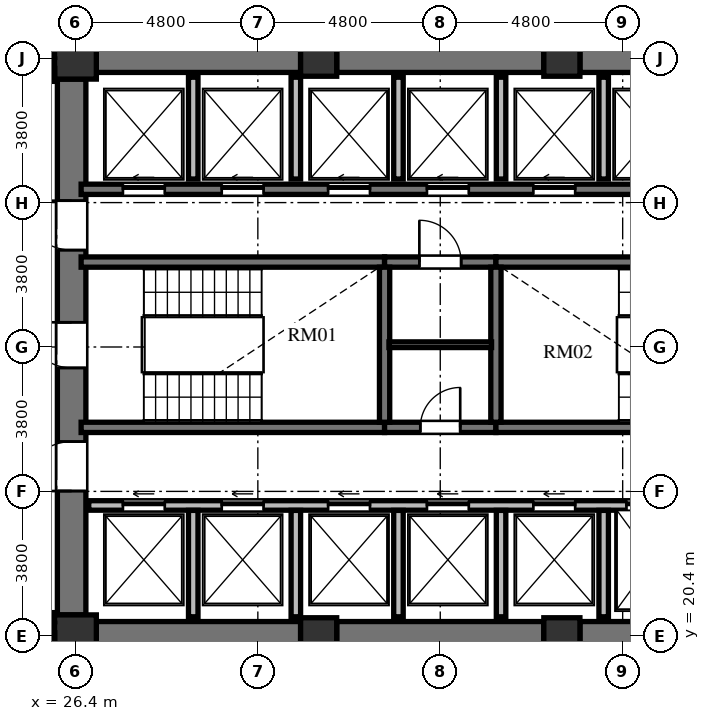
"""IFC4 building model, lengths in metres.
Left out: names, types, materials, properties, quantities, classifications, styles, units other than length and angle.
Written with IfcOpenShell. Run it as: python <this file> out.ifc"""

import sys

from ifc_helpers import new_model, si_unit, direction, frame, frame_2d, origin, origin_2d, place, context, subcontext, project, spatial, rectangle, extrude, element, fill, save


model = new_model("IFC4")
c1 = context("Model", 3, precision=1e-05, world=origin(), true_north=direction((0.0, 1.0)))
c2 = subcontext(c1, "Body", "Model", "MODEL_VIEW")
j1 = project(units=[si_unit("LENGTHUNIT", "METRE"), si_unit("PLANEANGLEUNIT", "RADIAN")], contexts=[c1])
p1 = place(None, origin())
s1 = spatial("IfcSite", under=j1, at=p1, CompositionType="ELEMENT")
p2 = place(p1, origin())
s2 = spatial("IfcBuilding", under=s1, at=p2, CompositionType="ELEMENT")
p3 = place(p2, frame((0.0, 0.0, 103.632)))
s3 = spatial("IfcBuildingStorey", under=s2, at=p3, CompositionType="ELEMENT", Elevation=103.632)
p4 = place(p3, frame((26.4, 20.4, 0.0), z_axis=(0.0, 0.0, 1.0), x_axis=(1.0, 0.0, 0.0)))
e1 = element("IfcColumn", 1, at=p4, inside=s3, PredefinedType="COLUMN", context=c2, shape_type="SweptSolid", body=[
    extrude(rectangle(XDim=1.1, YDim=1.1, at=origin_2d()), origin(), (0.0, 0.0, 1.0), 3.648),
])
for number, where, z_axis, x_axis in (
    (2, (32.8, 20.4, 0.0), (0.0, 0.0, 1.0), (1.0, 0.0, 0.0)),
    (3, (39.2, 20.4, 0.0), (0.0, 0.0, 1.0), (1.0, 0.0, 0.0)),
    (4, (39.2, 35.6, 0.0), (0.0, 0.0, 1.0), (1.0, 0.0, 0.0)),
    (5, (32.8, 35.6, 0.0), (0.0, 0.0, 1.0), (1.0, 0.0, 0.0)),
):
    element("IfcColumn", number, at=place(p3, frame(where, z_axis=z_axis, x_axis=x_axis)), inside=s3, PredefinedType="COLUMN", context=c2, shape_type="SweptSolid", body=[
        extrude(rectangle(XDim=0.95, YDim=0.95, at=origin_2d()), origin(), (0.0, 0.0, 1.0), 3.648),
    ])
p5 = place(p3, frame((26.4, 35.6, 0.0), z_axis=(0.0, 0.0, 1.0), x_axis=(1.0, 0.0, 0.0)))
e6 = element("IfcColumn", 6, at=p5, inside=s3, PredefinedType="COLUMN", context=c2, shape_type="SweptSolid", body=[
    extrude(rectangle(XDim=1.1, YDim=1.1, at=origin_2d()), origin(), (0.0, 0.0, 1.0), 3.648),
])
p6 = place(p3, frame((26.3, 20.95, 0.0), z_axis=(0.0, 0.0, 1.0), x_axis=(0.0, 1.0, 0.0)))
e7 = element("IfcWall", 7, at=p6, inside=s3, PredefinedType="SHEAR", context=c2, shape_type="SweptSolid", body=[
    extrude(rectangle(XDim=14.1, YDim=0.75, at=frame_2d((7.05, 0.0))), origin(), (0.0, 0.0, 1.0), 3.648),
])
p7 = place(p6, frame((6.5, 0.0, 0.0)))
e8 = element("IfcOpeningElement", 8, at=p7, cuts=e7, PredefinedType="OPENING", context=c2, shape_type="SweptSolid", body=[
    extrude(rectangle(XDim=1.2, YDim=2.15, at=frame_2d((0.6, 1.075))), frame((0.0, 0.385, 0.0), z_axis=(0.0, -1.0, 0.0), x_axis=(1.0, 0.0, 0.0)), (0.0, 0.0, 1.0), 0.77),
])
p8 = place(p6, frame((9.6, 0.0, 0.0)))
e9 = element("IfcOpeningElement", 9, at=p8, cuts=e7, PredefinedType="OPENING", context=c2, shape_type="SweptSolid", body=[
    extrude(rectangle(XDim=1.3, YDim=2.2, at=frame_2d((0.65, 1.1))), frame((0.0, 0.385, 0.0), z_axis=(0.0, -1.0, 0.0), x_axis=(1.0, 0.0, 0.0)), (0.0, 0.0, 1.0), 0.77),
])
p9 = place(p6, frame((3.26, 0.0, 0.0)))
e10 = element("IfcOpeningElement", 10, at=p9, cuts=e7, PredefinedType="OPENING", context=c2, shape_type="SweptSolid", body=[
    extrude(rectangle(XDim=1.3, YDim=2.2, at=frame_2d((0.65, 1.1))), frame((0.0, 0.385, 0.0), z_axis=(0.0, -1.0, 0.0), x_axis=(1.0, 0.0, 0.0)), (0.0, 0.0, 1.0), 0.77),
])
for number, where, z_axis, x_axis in (
    (11, (26.95, 20.4, 0.0), (0.0, 0.0, 1.0), (1.0, 0.0, 0.0)),
    (12, (26.95, 35.6, 0.0), (0.0, 0.0, 1.0), (1.0, 0.0, 0.0)),
):
    element("IfcWall", number, at=place(p3, frame(where, z_axis=z_axis, x_axis=x_axis)), inside=s3, PredefinedType="SHEAR", context=c2, shape_type="SweptSolid", body=[
        extrude(rectangle(XDim=5.375, YDim=0.75, at=frame_2d((2.688, 0.0))), origin(), (0.0, 0.0, 1.0), 3.648),
    ])
for number, where, z_axis, x_axis in (
    (13, (33.275, 20.4, 0.0), (0.0, 0.0, 1.0), (1.0, 0.0, 0.0)),
    (14, (33.275, 35.6, 0.0), (0.0, 0.0, 1.0), (1.0, 0.0, 0.0)),
):
    element("IfcWall", number, at=place(p3, frame(where, z_axis=z_axis, x_axis=x_axis)), inside=s3, PredefinedType="SHEAR", context=c2, shape_type="SweptSolid", body=[
        extrude(rectangle(XDim=5.45, YDim=0.75, at=frame_2d((2.725, 0.0))), origin(), (0.0, 0.0, 1.0), 3.648),
    ])
for number, where, z_axis, x_axis in (
    (15, (39.675, 20.4, 0.0), (0.0, 0.0, 1.0), (1.0, 0.0, 0.0)),
    (16, (39.675, 35.6, 0.0), (0.0, 0.0, 1.0), (1.0, 0.0, 0.0)),
):
    element("IfcWall", number, at=place(p3, frame(where, z_axis=z_axis, x_axis=x_axis)), inside=s3, PredefinedType="SHEAR", context=c2, shape_type="SweptSolid", body=[
        extrude(rectangle(XDim=5.375, YDim=0.75, at=frame_2d((2.688, 0.0))), origin(), (0.0, 0.0, 1.0), 3.648),
    ])
p10 = place(p3, frame((26.55, 30.235, 0.0), z_axis=(0.0, 0.0, 1.0), x_axis=(1.0, 0.0, 0.0)))
e17 = element("IfcWall", 17, at=p10, inside=s3, PredefinedType="SHEAR", context=c2, shape_type="SweptSolid", body=[
    extrude(rectangle(XDim=7.985, YDim=0.27, at=frame_2d((3.992, 0.0))), origin(), (0.0, 0.0, 1.0), 3.648),
])
p11 = place(p3, frame((34.535, 30.235, 0.0), z_axis=(0.0, 0.0, 1.0), x_axis=(1.0, 0.0, 0.0)))
e18 = element("IfcWall", 18, at=p11, inside=s3, PredefinedType="SHEAR", context=c2, shape_type="SweptSolid", body=[
    extrude(rectangle(XDim=2.93, YDim=0.27, at=frame_2d((1.465, 0.0))), origin(), (0.0, 0.0, 1.0), 3.648),
])
p12 = place(p11, frame((0.915, 0.0, 0.0)))
e19 = element("IfcOpeningElement", 19, at=p12, cuts=e18, PredefinedType="OPENING", context=c2, shape_type="SweptSolid", body=[
    extrude(rectangle(XDim=1.1, YDim=2.15, at=frame_2d((0.55, 1.075))), frame((0.0, 0.145, 0.0), z_axis=(0.0, -1.0, 0.0), x_axis=(1.0, 0.0, 0.0)), (0.0, 0.0, 1.0), 0.29),
])
p13 = place(p3, frame((37.465, 30.235, 0.0), z_axis=(0.0, 0.0, 1.0), x_axis=(1.0, 0.0, 0.0)))
e20 = element("IfcWall", 20, at=p13, inside=s3, PredefinedType="SHEAR", context=c2, shape_type="SweptSolid", body=[
    extrude(rectangle(XDim=7.985, YDim=0.27, at=frame_2d((3.992, 0.0))), origin(), (0.0, 0.0, 1.0), 3.648),
])
p14 = place(p13, frame((6.455, 0.0, 0.0)))
e21 = element("IfcOpeningElement", 21, at=p14, cuts=e20, PredefinedType="OPENING", context=c2, shape_type="SweptSolid", body=[
    extrude(rectangle(XDim=1.2, YDim=2.15, at=frame_2d((0.6, 1.075))), frame((0.0, 0.145, 0.0), z_axis=(0.0, -1.0, 0.0), x_axis=(1.0, 0.0, 0.0)), (0.0, 0.0, 1.0), 0.29),
])
p15 = place(p3, frame((26.55, 25.885, 0.0), z_axis=(0.0, 0.0, 1.0), x_axis=(1.0, 0.0, 0.0)))
e22 = element("IfcWall", 22, at=p15, inside=s3, PredefinedType="SHEAR", context=c2, shape_type="SweptSolid", body=[
    extrude(rectangle(XDim=7.985, YDim=0.27, at=frame_2d((3.992, 0.0))), origin(), (0.0, 0.0, 1.0), 3.648),
])
p16 = place(p3, frame((34.535, 25.885, 0.0), z_axis=(0.0, 0.0, 1.0), x_axis=(1.0, 0.0, 0.0)))
e23 = element("IfcWall", 23, at=p16, inside=s3, PredefinedType="SHEAR", context=c2, shape_type="SweptSolid", body=[
    extrude(rectangle(XDim=2.93, YDim=0.27, at=frame_2d((1.465, 0.0))), origin(), (0.0, 0.0, 1.0), 3.648),
])
p17 = place(p16, frame((0.94, 0.0, 0.0)))
e24 = element("IfcOpeningElement", 24, at=p17, cuts=e23, PredefinedType="OPENING", context=c2, shape_type="SweptSolid", body=[
    extrude(rectangle(XDim=1.05, YDim=2.15, at=frame_2d((0.525, 1.075))), frame((0.0, 0.145, 0.0), z_axis=(0.0, -1.0, 0.0), x_axis=(1.0, 0.0, 0.0)), (0.0, 0.0, 1.0), 0.29),
])
p18 = place(p3, frame((37.465, 25.885, 0.0), z_axis=(0.0, 0.0, 1.0), x_axis=(1.0, 0.0, 0.0)))
e25 = element("IfcWall", 25, at=p18, inside=s3, PredefinedType="SHEAR", context=c2, shape_type="SweptSolid", body=[
    extrude(rectangle(XDim=7.985, YDim=0.27, at=frame_2d((3.992, 0.0))), origin(), (0.0, 0.0, 1.0), 3.648),
])
for number, where, z_axis, x_axis in (
    (26, (34.535, 26.02, 0.0), (0.0, 0.0, 1.0), (0.0, 1.0, 0.0)),
    (27, (37.465, 26.02, 0.0), (0.0, 0.0, 1.0), (0.0, 1.0, 0.0)),
):
    element("IfcWall", number, at=place(p3, frame(where, z_axis=z_axis, x_axis=x_axis)), inside=s3, PredefinedType="SHEAR", context=c2, shape_type="SweptSolid", body=[
        extrude(rectangle(XDim=4.08, YDim=0.27, at=frame_2d((2.04, 0.0))), origin(), (0.0, 0.0, 1.0), 3.648),
    ])
p19 = place(p3, frame((34.65, 28.06, 0.0), z_axis=(0.0, 0.0, 1.0), x_axis=(1.0, 0.0, 0.0)))
e28 = element("IfcWall", 28, at=p19, inside=s3, PredefinedType="PARTITIONING", context=c2, shape_type="SweptSolid", body=[
    extrude(rectangle(XDim=2.7, YDim=0.15, at=frame_2d((1.35, 0.0))), origin(), (0.0, 0.0, 1.0), 3.428),
])
p20 = place(p3, frame((26.55, 32.15, 0.0), z_axis=(0.0, 0.0, 1.0), x_axis=(1.0, 0.0, 0.0)))
e29 = element("IfcWall", 29, at=p20, inside=s3, PredefinedType="SHEAR", context=c2, shape_type="SweptSolid", body=[
    extrude(rectangle(XDim=16.4, YDim=0.27, at=frame_2d((8.2, 0.0))), origin(), (0.0, 0.0, 1.0), 3.648),
])
p21 = place(p20, frame((1.1, 0.0, 0.0)))
e30 = element("IfcOpeningElement", 30, at=p21, cuts=e29, PredefinedType="OPENING", context=c2, shape_type="SweptSolid", body=[
    extrude(rectangle(XDim=1.1, YDim=2.2, at=frame_2d((0.55, 1.1))), frame((0.0, 0.145, 0.0), z_axis=(0.0, -1.0, 0.0), x_axis=(1.0, 0.0, 0.0)), (0.0, 0.0, 1.0), 0.29),
])
p22 = place(p20, frame((3.7, 0.0, 0.0)))
e31 = element("IfcOpeningElement", 31, at=p22, cuts=e29, PredefinedType="OPENING", context=c2, shape_type="SweptSolid", body=[
    extrude(rectangle(XDim=1.1, YDim=2.2, at=frame_2d((0.55, 1.1))), frame((0.0, 0.145, 0.0), z_axis=(0.0, -1.0, 0.0), x_axis=(1.0, 0.0, 0.0)), (0.0, 0.0, 1.0), 0.29),
])
p23 = place(p20, frame((6.5, 0.0, 0.0)))
e32 = element("IfcOpeningElement", 32, at=p23, cuts=e29, PredefinedType="OPENING", context=c2, shape_type="SweptSolid", body=[
    extrude(rectangle(XDim=1.1, YDim=2.2, at=frame_2d((0.55, 1.1))), frame((0.0, 0.145, 0.0), z_axis=(0.0, -1.0, 0.0), x_axis=(1.0, 0.0, 0.0)), (0.0, 0.0, 1.0), 0.29),
])
p24 = place(p20, frame((9.1, 0.0, 0.0)))
e33 = element("IfcOpeningElement", 33, at=p24, cuts=e29, PredefinedType="OPENING", context=c2, shape_type="SweptSolid", body=[
    extrude(rectangle(XDim=1.1, YDim=2.2, at=frame_2d((0.55, 1.1))), frame((0.0, 0.145, 0.0), z_axis=(0.0, -1.0, 0.0), x_axis=(1.0, 0.0, 0.0)), (0.0, 0.0, 1.0), 0.29),
])
p25 = place(p20, frame((11.9, 0.0, 0.0)))
e34 = element("IfcOpeningElement", 34, at=p25, cuts=e29, PredefinedType="OPENING", context=c2, shape_type="SweptSolid", body=[
    extrude(rectangle(XDim=1.1, YDim=2.2, at=frame_2d((0.55, 1.1))), frame((0.0, 0.145, 0.0), z_axis=(0.0, -1.0, 0.0), x_axis=(1.0, 0.0, 0.0)), (0.0, 0.0, 1.0), 0.29),
])
p26 = place(p20, frame((14.5, 0.0, 0.0)))
e35 = element("IfcOpeningElement", 35, at=p26, cuts=e29, PredefinedType="OPENING", context=c2, shape_type="SweptSolid", body=[
    extrude(rectangle(XDim=1.1, YDim=2.2, at=frame_2d((0.55, 1.1))), frame((0.0, 0.145, 0.0), z_axis=(0.0, -1.0, 0.0), x_axis=(1.0, 0.0, 0.0)), (0.0, 0.0, 1.0), 0.29),
])
p27 = place(p3, frame((26.75, 23.83, 0.0), z_axis=(0.0, 0.0, 1.0), x_axis=(1.0, 0.0, 0.0)))
e36 = element("IfcWall", 36, at=p27, inside=s3, PredefinedType="SOLIDWALL", context=c2, shape_type="SweptSolid", body=[
    extrude(rectangle(XDim=16.2, YDim=0.25, at=frame_2d((8.1, 0.0))), origin(), (0.0, 0.0, 1.0), 3.428),
])
p28 = place(p27, frame((0.9, 0.0, 0.0)))
e37 = element("IfcOpeningElement", 37, at=p28, cuts=e36, PredefinedType="OPENING", context=c2, shape_type="SweptSolid", body=[
    extrude(rectangle(XDim=1.1, YDim=2.2, at=frame_2d((0.55, 1.1))), frame((0.0, 0.135, 0.0), z_axis=(0.0, -1.0, 0.0), x_axis=(1.0, 0.0, 0.0)), (0.0, 0.0, 1.0), 0.27),
])
p29 = place(p27, frame((3.5, 0.0, 0.0)))
e38 = element("IfcOpeningElement", 38, at=p29, cuts=e36, PredefinedType="OPENING", context=c2, shape_type="SweptSolid", body=[
    extrude(rectangle(XDim=1.1, YDim=2.2, at=frame_2d((0.55, 1.1))), frame((0.0, 0.135, 0.0), z_axis=(0.0, -1.0, 0.0), x_axis=(1.0, 0.0, 0.0)), (0.0, 0.0, 1.0), 0.27),
])
p30 = place(p27, frame((6.3, 0.0, 0.0)))
e39 = element("IfcOpeningElement", 39, at=p30, cuts=e36, PredefinedType="OPENING", context=c2, shape_type="SweptSolid", body=[
    extrude(rectangle(XDim=1.1, YDim=2.2, at=frame_2d((0.55, 1.1))), frame((0.0, 0.135, 0.0), z_axis=(0.0, -1.0, 0.0), x_axis=(1.0, 0.0, 0.0)), (0.0, 0.0, 1.0), 0.27),
])
p31 = place(p27, frame((8.9, 0.0, 0.0)))
e40 = element("IfcOpeningElement", 40, at=p31, cuts=e36, PredefinedType="OPENING", context=c2, shape_type="SweptSolid", body=[
    extrude(rectangle(XDim=1.1, YDim=2.2, at=frame_2d((0.55, 1.1))), frame((0.0, 0.135, 0.0), z_axis=(0.0, -1.0, 0.0), x_axis=(1.0, 0.0, 0.0)), (0.0, 0.0, 1.0), 0.27),
])
p32 = place(p27, frame((11.7, 0.0, 0.0)))
e41 = element("IfcOpeningElement", 41, at=p32, cuts=e36, PredefinedType="OPENING", context=c2, shape_type="SweptSolid", body=[
    extrude(rectangle(XDim=1.1, YDim=2.2, at=frame_2d((0.55, 1.1))), frame((0.0, 0.135, 0.0), z_axis=(0.0, -1.0, 0.0), x_axis=(1.0, 0.0, 0.0)), (0.0, 0.0, 1.0), 0.27),
])
p33 = place(p27, frame((14.15, 0.0, 0.0)))
e42 = element("IfcOpeningElement", 42, at=p33, cuts=e36, PredefinedType="OPENING", context=c2, shape_type="SweptSolid", body=[
    extrude(rectangle(XDim=1.4, YDim=2.3, at=frame_2d((0.7, 1.15))), frame((0.0, 0.135, 0.0), z_axis=(0.0, -1.0, 0.0), x_axis=(1.0, 0.0, 0.0)), (0.0, 0.0, 1.0), 0.27),
])
p34 = place(p3, frame((29.5, 32.42, 0.0), z_axis=(0.0, 0.0, 1.0), x_axis=(0.0, 1.0, 0.0)))
e43 = element("IfcWall", 43, at=p34, inside=s3, PredefinedType="SOLIDWALL", context=c2, shape_type="SweptSolid", body=[
    extrude(rectangle(XDim=2.68, YDim=0.25, at=frame_2d((1.34, 0.0))), origin(), (0.0, 0.0, 1.0), 3.428),
])
p35 = place(p3, frame((29.5, 20.9, 0.0), z_axis=(0.0, 0.0, 1.0), x_axis=(0.0, 1.0, 0.0)))
e44 = element("IfcWall", 44, at=p35, inside=s3, PredefinedType="SOLIDWALL", context=c2, shape_type="SweptSolid", body=[
    extrude(rectangle(XDim=2.8, YDim=0.25, at=frame_2d((1.4, 0.0))), origin(), (0.0, 0.0, 1.0), 3.428),
])
p36 = place(p3, frame((32.2, 32.42, 0.0), z_axis=(0.0, 0.0, 1.0), x_axis=(0.0, 1.0, 0.0)))
e45 = element("IfcWall", 45, at=p36, inside=s3, PredefinedType="SOLIDWALL", context=c2, shape_type="SweptSolid", body=[
    extrude(rectangle(XDim=2.68, YDim=0.25, at=frame_2d((1.34, 0.0))), origin(), (0.0, 0.0, 1.0), 3.428),
])
p37 = place(p3, frame((32.2, 20.9, 0.0), z_axis=(0.0, 0.0, 1.0), x_axis=(0.0, 1.0, 0.0)))
e46 = element("IfcWall", 46, at=p37, inside=s3, PredefinedType="SOLIDWALL", context=c2, shape_type="SweptSolid", body=[
    extrude(rectangle(XDim=2.8, YDim=0.25, at=frame_2d((1.4, 0.0))), origin(), (0.0, 0.0, 1.0), 3.428),
])
p38 = place(p3, frame((34.9, 32.42, 0.0), z_axis=(0.0, 0.0, 1.0), x_axis=(0.0, 1.0, 0.0)))
e47 = element("IfcWall", 47, at=p38, inside=s3, PredefinedType="SOLIDWALL", context=c2, shape_type="SweptSolid", body=[
    extrude(rectangle(XDim=2.68, YDim=0.25, at=frame_2d((1.34, 0.0))), origin(), (0.0, 0.0, 1.0), 3.428),
])
p39 = place(p3, frame((34.9, 20.9, 0.0), z_axis=(0.0, 0.0, 1.0), x_axis=(0.0, 1.0, 0.0)))
e48 = element("IfcWall", 48, at=p39, inside=s3, PredefinedType="SOLIDWALL", context=c2, shape_type="SweptSolid", body=[
    extrude(rectangle(XDim=2.8, YDim=0.25, at=frame_2d((1.4, 0.0))), origin(), (0.0, 0.0, 1.0), 3.428),
])
p40 = place(p3, frame((37.6, 32.42, 0.0), z_axis=(0.0, 0.0, 1.0), x_axis=(0.0, 1.0, 0.0)))
e49 = element("IfcWall", 49, at=p40, inside=s3, PredefinedType="SOLIDWALL", context=c2, shape_type="SweptSolid", body=[
    extrude(rectangle(XDim=2.68, YDim=0.25, at=frame_2d((1.34, 0.0))), origin(), (0.0, 0.0, 1.0), 3.428),
])
p41 = place(p3, frame((37.6, 20.9, 0.0), z_axis=(0.0, 0.0, 1.0), x_axis=(0.0, 1.0, 0.0)))
e50 = element("IfcWall", 50, at=p41, inside=s3, PredefinedType="SOLIDWALL", context=c2, shape_type="SweptSolid", body=[
    extrude(rectangle(XDim=2.8, YDim=0.25, at=frame_2d((1.4, 0.0))), origin(), (0.0, 0.0, 1.0), 3.428),
])
p42 = place(p3, frame((40.3, 32.42, 0.0), z_axis=(0.0, 0.0, 1.0), x_axis=(0.0, 1.0, 0.0)))
e51 = element("IfcWall", 51, at=p42, inside=s3, PredefinedType="SOLIDWALL", context=c2, shape_type="SweptSolid", body=[
    extrude(rectangle(XDim=2.68, YDim=0.25, at=frame_2d((1.34, 0.0))), origin(), (0.0, 0.0, 1.0), 3.428),
])
p43 = place(p3, frame((40.3, 20.9, 0.0), z_axis=(0.0, 0.0, 1.0), x_axis=(0.0, 1.0, 0.0)))
e52 = element("IfcWall", 52, at=p43, inside=s3, PredefinedType="SOLIDWALL", context=c2, shape_type="SweptSolid", body=[
    extrude(rectangle(XDim=2.8, YDim=0.25, at=frame_2d((1.4, 0.0))), origin(), (0.0, 0.0, 1.0), 3.428),
])
for number, where, z_axis, x_axis in (
    (53, (25.83, 36.21, 0.0), (0.0, 0.0, 1.0), (0.0, -1.0, 0.0)),
    (54, (25.83, 21.01, 0.0), (0.0, 0.0, 1.0), (0.0, -1.0, 0.0)),
):
    element("IfcWall", number, at=place(p3, frame(where, z_axis=z_axis, x_axis=x_axis)), inside=s3, PredefinedType="PARTITIONING", context=c2, shape_type="SweptSolid", body=[
        extrude(rectangle(XDim=1.22, YDim=0.18, at=frame_2d((0.61, 0.0))), origin(), (0.0, 0.0, 1.0), 3.428),
    ])
p44 = place(p7, origin())
e55 = element("IfcDoor", 55, at=p44, inside=s3, OperationType="SINGLE_SWING_RIGHT", PredefinedType="DOOR", context=c2, shape_type="SweptSolid", body=[
    extrude(rectangle(XDim=1.2, YDim=2.15, at=frame_2d((0.6, 1.075))), frame((0.0, 0.025, 0.0), z_axis=(0.0, -1.0, 0.0), x_axis=(1.0, 0.0, 0.0)), (0.0, 0.0, 1.0), 0.05),
])
fill(e8, e55)
p45 = place(p17, origin())
e56 = element("IfcDoor", 56, at=p45, inside=s3, OperationType="SINGLE_SWING_RIGHT", PredefinedType="DOOR", context=c2, shape_type="SweptSolid", body=[
    extrude(rectangle(XDim=1.05, YDim=2.15, at=frame_2d((0.525, 1.075))), frame((0.0, 0.025, 0.0), z_axis=(0.0, -1.0, 0.0), x_axis=(1.0, 0.0, 0.0)), (0.0, 0.0, 1.0), 0.05),
])
fill(e24, e56)
p46 = place(p12, origin())
e57 = element("IfcDoor", 57, at=p46, inside=s3, OperationType="SINGLE_SWING_LEFT", PredefinedType="DOOR", context=c2, shape_type="SweptSolid", body=[
    extrude(rectangle(XDim=1.1, YDim=2.15, at=frame_2d((0.55, 1.075))), frame((0.0, 0.025, 0.0), z_axis=(0.0, -1.0, 0.0), x_axis=(1.0, 0.0, 0.0)), (0.0, 0.0, 1.0), 0.05),
])
fill(e19, e57)
p47 = place(p8, origin())
e58 = element("IfcDoor", 58, at=p47, inside=s3, OperationType="SINGLE_SWING_RIGHT", PredefinedType="DOOR", context=c2, shape_type="SweptSolid", body=[
    extrude(rectangle(XDim=1.3, YDim=2.2, at=frame_2d((0.65, 1.1))), frame((0.0, 0.025, 0.0), z_axis=(0.0, -1.0, 0.0), x_axis=(1.0, 0.0, 0.0)), (0.0, 0.0, 1.0), 0.05),
])
fill(e9, e58)
p48 = place(p9, origin())
e59 = element("IfcDoor", 59, at=p48, inside=s3, OperationType="SINGLE_SWING_LEFT", PredefinedType="DOOR", context=c2, shape_type="SweptSolid", body=[
    extrude(rectangle(XDim=1.3, YDim=2.2, at=frame_2d((0.65, 1.1))), frame((0.0, 0.025, 0.0), z_axis=(0.0, -1.0, 0.0), x_axis=(1.0, 0.0, 0.0)), (0.0, 0.0, 1.0), 0.05),
])
fill(e10, e59)
p49 = place(p21, origin())
e60 = element("IfcDoor", 60, at=p49, inside=s3, OperationType="SLIDING_TO_LEFT", PredefinedType="DOOR", context=c2, shape_type="SweptSolid", body=[
    extrude(rectangle(XDim=1.1, YDim=2.2, at=frame_2d((0.55, 1.1))), frame((0.0, 0.025, 0.0), z_axis=(0.0, -1.0, 0.0), x_axis=(1.0, 0.0, 0.0)), (0.0, 0.0, 1.0), 0.05),
])
fill(e30, e60)
p50 = place(p22, origin())
e61 = element("IfcDoor", 61, at=p50, inside=s3, OperationType="SLIDING_TO_LEFT", PredefinedType="DOOR", context=c2, shape_type="SweptSolid", body=[
    extrude(rectangle(XDim=1.1, YDim=2.2, at=frame_2d((0.55, 1.1))), frame((0.0, 0.025, 0.0), z_axis=(0.0, -1.0, 0.0), x_axis=(1.0, 0.0, 0.0)), (0.0, 0.0, 1.0), 0.05),
])
fill(e31, e61)
p51 = place(p28, origin())
e62 = element("IfcDoor", 62, at=p51, inside=s3, OperationType="SLIDING_TO_LEFT", PredefinedType="DOOR", context=c2, shape_type="SweptSolid", body=[
    extrude(rectangle(XDim=1.1, YDim=2.2, at=frame_2d((0.55, 1.1))), frame((0.0, 0.025, 0.0), z_axis=(0.0, -1.0, 0.0), x_axis=(1.0, 0.0, 0.0)), (0.0, 0.0, 1.0), 0.05),
])
fill(e37, e62)
p52 = place(p29, origin())
e63 = element("IfcDoor", 63, at=p52, inside=s3, OperationType="SLIDING_TO_LEFT", PredefinedType="DOOR", context=c2, shape_type="SweptSolid", body=[
    extrude(rectangle(XDim=1.1, YDim=2.2, at=frame_2d((0.55, 1.1))), frame((0.0, 0.025, 0.0), z_axis=(0.0, -1.0, 0.0), x_axis=(1.0, 0.0, 0.0)), (0.0, 0.0, 1.0), 0.05),
])
fill(e38, e63)
p53 = place(p23, origin())
e64 = element("IfcDoor", 64, at=p53, inside=s3, OperationType="SLIDING_TO_LEFT", PredefinedType="DOOR", context=c2, shape_type="SweptSolid", body=[
    extrude(rectangle(XDim=1.1, YDim=2.2, at=frame_2d((0.55, 1.1))), frame((0.0, 0.025, 0.0), z_axis=(0.0, -1.0, 0.0), x_axis=(1.0, 0.0, 0.0)), (0.0, 0.0, 1.0), 0.05),
])
fill(e32, e64)
p54 = place(p24, origin())
e65 = element("IfcDoor", 65, at=p54, inside=s3, OperationType="SLIDING_TO_LEFT", PredefinedType="DOOR", context=c2, shape_type="SweptSolid", body=[
    extrude(rectangle(XDim=1.1, YDim=2.2, at=frame_2d((0.55, 1.1))), frame((0.0, 0.025, 0.0), z_axis=(0.0, -1.0, 0.0), x_axis=(1.0, 0.0, 0.0)), (0.0, 0.0, 1.0), 0.05),
])
fill(e33, e65)
p55 = place(p30, origin())
e66 = element("IfcDoor", 66, at=p55, inside=s3, OperationType="SLIDING_TO_LEFT", PredefinedType="DOOR", context=c2, shape_type="SweptSolid", body=[
    extrude(rectangle(XDim=1.1, YDim=2.2, at=frame_2d((0.55, 1.1))), frame((0.0, 0.025, 0.0), z_axis=(0.0, -1.0, 0.0), x_axis=(1.0, 0.0, 0.0)), (0.0, 0.0, 1.0), 0.05),
])
fill(e39, e66)
p56 = place(p31, origin())
e67 = element("IfcDoor", 67, at=p56, inside=s3, OperationType="SLIDING_TO_LEFT", PredefinedType="DOOR", context=c2, shape_type="SweptSolid", body=[
    extrude(rectangle(XDim=1.1, YDim=2.2, at=frame_2d((0.55, 1.1))), frame((0.0, 0.025, 0.0), z_axis=(0.0, -1.0, 0.0), x_axis=(1.0, 0.0, 0.0)), (0.0, 0.0, 1.0), 0.05),
])
fill(e40, e67)
p57 = place(p25, origin())
e68 = element("IfcDoor", 68, at=p57, inside=s3, OperationType="SLIDING_TO_LEFT", PredefinedType="DOOR", context=c2, shape_type="SweptSolid", body=[
    extrude(rectangle(XDim=1.1, YDim=2.2, at=frame_2d((0.55, 1.1))), frame((0.0, 0.025, 0.0), z_axis=(0.0, -1.0, 0.0), x_axis=(1.0, 0.0, 0.0)), (0.0, 0.0, 1.0), 0.05),
])
fill(e34, e68)
p58 = place(p32, origin())
e69 = element("IfcDoor", 69, at=p58, inside=s3, OperationType="SLIDING_TO_LEFT", PredefinedType="DOOR", context=c2, shape_type="SweptSolid", body=[
    extrude(rectangle(XDim=1.1, YDim=2.2, at=frame_2d((0.55, 1.1))), frame((0.0, 0.025, 0.0), z_axis=(0.0, -1.0, 0.0), x_axis=(1.0, 0.0, 0.0)), (0.0, 0.0, 1.0), 0.05),
])
fill(e41, e69)
p59 = place(p33, origin())
e70 = element("IfcDoor", 70, at=p59, inside=s3, OperationType="SLIDING_TO_LEFT", PredefinedType="DOOR", context=c2, shape_type="SweptSolid", body=[
    extrude(rectangle(XDim=1.4, YDim=2.3, at=frame_2d((0.7, 1.15))), frame((0.0, 0.025, 0.0), z_axis=(0.0, -1.0, 0.0), x_axis=(1.0, 0.0, 0.0)), (0.0, 0.0, 1.0), 0.05),
])
fill(e42, e70)
save(model, sys.argv[1])
